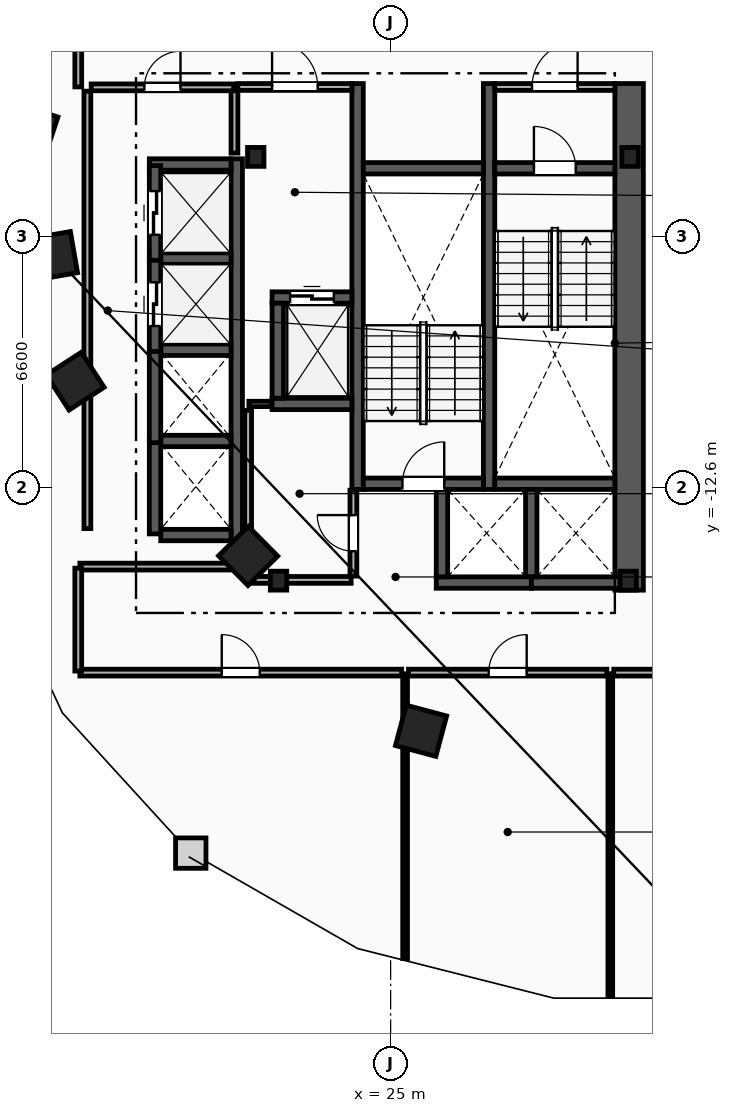
"""IFC4 building model, lengths in metres.
Left out: names, types, materials, properties, quantities, classifications, styles, units other than length and angle.
Written with IfcOpenShell. Run it as: python <this file> out.ifc"""

import sys

from ifc_helpers import new_model, si_unit, direction, frame, frame_2d, origin, origin_2d, place, context, subcontext, project, spatial, rectangle, i_section, extrude, element, fill, save


model = new_model("IFC4")
c1 = context("Model", 3, precision=1e-05, world=origin(), true_north=direction((0.0, 1.0)))
c2 = subcontext(c1, "Body", "Model", "MODEL_VIEW")
j1 = project(units=[si_unit("LENGTHUNIT", "METRE"), si_unit("PLANEANGLEUNIT", "RADIAN")], contexts=[c1])
p1 = place(None, origin())
s1 = spatial("IfcSite", under=j1, at=p1, CompositionType="ELEMENT")
p2 = place(p1, origin())
s2 = spatial("IfcBuilding", under=s1, at=p2, CompositionType="ELEMENT")
p3 = place(p2, frame((0.0, 0.0, 125.0)))
s3 = spatial("IfcBuildingStorey", under=s2, at=p3, CompositionType="ELEMENT", Elevation=125.0)
for number, where, z_axis, x_axis in (
    (1, (31.3, -3.9, 0.0), (0.0, 0.0, 1.0), (1.0, 0.0, 0.0)),
    (2, (21.45, -3.9, 0.0), (0.0, 0.0, 1.0), (1.0, 0.0, 0.0)),
    (3, (22.05, -15.05, 0.0), (0.0, 0.0, 1.0), (1.0, 0.0, 0.0)),
    (4, (31.25, -15.05, 0.0), (0.0, 0.0, 1.0), (1.0, 0.0, 0.0)),
):
    element("IfcColumn", number, at=place(p3, frame(where, z_axis=z_axis, x_axis=x_axis)), inside=s3, PredefinedType="COLUMN", context=c2, shape_type="SweptSolid", body=[
        extrude(i_section(OverallWidth=0.432, OverallDepth=0.498, WebThickness=0.056, FlangeThickness=0.089, FilletRadius=0.018, at=origin_2d()), origin(), (0.0, 0.0, 1.0), 3.6),
    ])
for number, where, z_axis, x_axis in (
    (5, (15.55, -3.2, 0.0), (0.0, 0.0, 1.0), (-0.315, -0.949, 0.0)),
    (6, (16.125, -6.5, 0.0), (0.0, 0.0, 1.0), (0.172, -0.985, 0.0)),
    (7, (16.7, -9.8, 0.0), (0.0, 0.0, 1.0), (0.544, -0.839, 0.0)),
    (8, (21.25, -14.4, 0.0), (0.0, 0.0, 1.0), (0.703, -0.711, 0.0)),
    (9, (25.8, -19.0, 0.0), (0.0, 0.0, 1.0), (0.966, -0.259, 0.0)),
):
    element("IfcColumn", number, at=place(p3, frame(where, z_axis=z_axis, x_axis=x_axis)), inside=s3, PredefinedType="COLUMN", context=c2, shape_type="SweptSolid", body=[
        extrude(rectangle(XDim=1.1, YDim=1.1, at=origin_2d()), origin(), (0.0, 0.0, 1.0), 3.6),
    ])
p4 = place(p3, frame((31.275, -15.3, 0.0), z_axis=(0.0, 0.0, 1.0), x_axis=(0.0, 1.0, 0.0)))
e10 = element("IfcWall", 10, at=p4, inside=s3, PredefinedType="SHEAR", context=c2, shape_type="SweptSolid", body=[
    extrude(rectangle(XDim=13.33, YDim=0.75, at=frame_2d((6.665, 0.0))), origin(), (0.0, 0.0, 1.0), 3.3),
])
for number, where, z_axis, x_axis in (
    (11, (27.59, -12.65, 0.0), (0.0, 0.0, 1.0), (0.0, 1.0, 0.0)),
    (12, (24.13, -12.65, 0.0), (0.0, 0.0, 1.0), (0.0, 1.0, 0.0)),
):
    element("IfcWall", number, at=place(p3, frame(where, z_axis=z_axis, x_axis=x_axis)), inside=s3, PredefinedType="SHEAR", context=c2, shape_type="SweptSolid", body=[
        extrude(rectangle(XDim=10.68, YDim=0.3, at=frame_2d((5.34, 0.0))), origin(), (0.0, 0.0, 1.0), 3.3),
    ])
p5 = place(p3, frame((27.74, -4.2, 0.0), z_axis=(0.0, 0.0, 1.0), x_axis=(1.0, 0.0, 0.0)))
e13 = element("IfcWall", 13, at=p5, inside=s3, PredefinedType="SHEAR", context=c2, shape_type="SweptSolid", body=[
    extrude(rectangle(XDim=3.16, YDim=0.3, at=frame_2d((1.58, 0.0))), origin(), (0.0, 0.0, 1.0), 3.3),
])
p6 = place(p5, frame((1.03, 0.0, 0.0)))
e14 = element("IfcOpeningElement", 14, at=p6, cuts=e13, PredefinedType="OPENING", context=c2, shape_type="SweptSolid", body=[
    extrude(rectangle(XDim=1.1, YDim=2.15, at=frame_2d((0.55, 1.075))), frame((0.0, 0.16, 0.0), z_axis=(0.0, -1.0, 0.0), x_axis=(1.0, 0.0, 0.0)), (0.0, 0.0, 1.0), 0.32),
])
p7 = place(p3, frame((27.74, -12.5, 0.0), z_axis=(0.0, 0.0, 1.0), x_axis=(1.0, 0.0, 0.0)))
e15 = element("IfcWall", 15, at=p7, inside=s3, PredefinedType="SHEAR", context=c2, shape_type="SweptSolid", body=[
    extrude(rectangle(XDim=3.16, YDim=0.3, at=frame_2d((1.58, 0.0))), origin(), (0.0, 0.0, 1.0), 3.3),
])
p8 = place(p3, frame((24.28, -12.5, 0.0), z_axis=(0.0, 0.0, 1.0), x_axis=(1.0, 0.0, 0.0)))
e16 = element("IfcWall", 16, at=p8, inside=s3, PredefinedType="SHEAR", context=c2, shape_type="SweptSolid", body=[
    extrude(rectangle(XDim=3.16, YDim=0.3, at=frame_2d((1.58, 0.0))), origin(), (0.0, 0.0, 1.0), 3.3),
])
p9 = place(p8, frame((1.03, 0.0, 0.0)))
e17 = element("IfcOpeningElement", 17, at=p9, cuts=e16, PredefinedType="OPENING", context=c2, shape_type="SweptSolid", body=[
    extrude(rectangle(XDim=1.1, YDim=2.15, at=frame_2d((0.55, 1.075))), frame((0.0, 0.16, 0.0), z_axis=(0.0, -1.0, 0.0), x_axis=(1.0, 0.0, 0.0)), (0.0, 0.0, 1.0), 0.32),
])
p10 = place(p3, frame((24.28, -4.2, 0.0), z_axis=(0.0, 0.0, 1.0), x_axis=(1.0, 0.0, 0.0)))
e18 = element("IfcWall", 18, at=p10, inside=s3, PredefinedType="SHEAR", context=c2, shape_type="SweptSolid", body=[
    extrude(rectangle(XDim=3.16, YDim=0.3, at=frame_2d((1.58, 0.0))), origin(), (0.0, 0.0, 1.0), 3.3),
])
p11 = place(p3, frame((20.89, -3.8, 0.0), z_axis=(0.0, 0.0, 1.0), x_axis=(0.0, 1.0, 0.0)))
e19 = element("IfcWall", 19, at=p11, inside=s3, PredefinedType="PARTITIONING", context=c2, shape_type="SweptSolid", body=[
    extrude(rectangle(XDim=1.65, YDim=0.18, at=frame_2d((0.825, 0.0))), origin(), (0.0, 0.0, 1.0), 3.3),
])
p12 = place(p3, frame((20.98, -2.06, 0.0), z_axis=(0.0, 0.0, 1.0), x_axis=(1.0, 0.0, 0.0)))
e20 = element("IfcWall", 20, at=p12, inside=s3, PredefinedType="PARTITIONING", context=c2, shape_type="SweptSolid", body=[
    extrude(rectangle(XDim=3.0, YDim=0.18, at=frame_2d((1.5, 0.0))), origin(), (0.0, 0.0, 1.0), 3.3),
])
p13 = place(p12, frame((0.9, 0.0, 0.0)))
e21 = element("IfcOpeningElement", 21, at=p13, cuts=e20, PredefinedType="OPENING", context=c2, shape_type="SweptSolid", body=[
    extrude(rectangle(XDim=1.2, YDim=2.15, at=frame_2d((0.6, 1.075))), frame((0.0, 0.1, 0.0), z_axis=(0.0, -1.0, 0.0), x_axis=(1.0, 0.0, 0.0)), (0.0, 0.0, 1.0), 0.2),
])
p14 = place(p3, frame((27.74, -2.06, 0.0), z_axis=(0.0, 0.0, 1.0), x_axis=(1.0, 0.0, 0.0)))
e22 = element("IfcWall", 22, at=p14, inside=s3, PredefinedType="PARTITIONING", context=c2, shape_type="SweptSolid", body=[
    extrude(rectangle(XDim=3.16, YDim=0.18, at=frame_2d((1.58, 0.0))), origin(), (0.0, 0.0, 1.0), 3.3),
])
p15 = place(p14, frame((0.98, 0.0, 0.0)))
e23 = element("IfcOpeningElement", 23, at=p15, cuts=e22, PredefinedType="OPENING", context=c2, shape_type="SweptSolid", body=[
    extrude(rectangle(XDim=1.2, YDim=2.15, at=frame_2d((0.6, 1.075))), frame((0.0, 0.1, 0.0), z_axis=(0.0, -1.0, 0.0), x_axis=(1.0, 0.0, 0.0)), (0.0, 0.0, 1.0), 0.2),
])
p16 = place(p3, frame((21.88, -7.6, 0.0), z_axis=(0.0, 0.0, 1.0), x_axis=(1.0, 0.0, 0.0)))
e24 = element("IfcWall", 24, at=p16, inside=s3, PredefinedType="SHEAR", context=c2, shape_type="SweptSolid", body=[
    extrude(rectangle(XDim=2.1, YDim=0.3, at=frame_2d((1.05, 0.0))), origin(), (0.0, 0.0, 1.0), 3.3),
])
p17 = place(p16, frame((0.475, 0.0, 0.0)))
e25 = element("IfcOpeningElement", 25, at=p17, cuts=e24, PredefinedType="OPENING", context=c2, shape_type="SweptSolid", body=[
    extrude(rectangle(XDim=1.15, YDim=2.2, at=frame_2d((0.575, 1.1))), frame((0.0, 0.16, 0.0), z_axis=(0.0, -1.0, 0.0), x_axis=(1.0, 0.0, 0.0)), (0.0, 0.0, 1.0), 0.32),
])
p18 = place(p3, frame((21.88, -10.4, 0.0), z_axis=(0.0, 0.0, 1.0), x_axis=(1.0, 0.0, 0.0)))
e26 = element("IfcWall", 26, at=p18, inside=s3, PredefinedType="SHEAR", context=c2, shape_type="SweptSolid", body=[
    extrude(rectangle(XDim=2.1, YDim=0.3, at=frame_2d((1.05, 0.0))), origin(), (0.0, 0.0, 1.0), 3.3),
])
for number, where, z_axis, x_axis in (
    (27, (22.03, -10.25, 0.0), (0.0, 0.0, 1.0), (0.0, 1.0, 0.0)),
    (28, (28.7, -15.1, 0.0), (0.0, 0.0, 1.0), (1.0, 0.0, 0.0)),
):
    element("IfcWall", number, at=place(p3, frame(where, z_axis=z_axis, x_axis=x_axis)), inside=s3, PredefinedType="SHEAR", context=c2, shape_type="SweptSolid", body=[
        extrude(rectangle(XDim=2.5, YDim=0.3, at=frame_2d((1.25, 0.0))), origin(), (0.0, 0.0, 1.0), 3.3),
    ])
p19 = place(p3, frame((28.7, -14.95, 0.0), z_axis=(0.0, 0.0, 1.0), x_axis=(0.0, 1.0, 0.0)))
e29 = element("IfcWall", 29, at=p19, inside=s3, PredefinedType="SHEAR", context=c2, shape_type="SweptSolid", body=[
    extrude(rectangle(XDim=2.3, YDim=0.3, at=frame_2d((1.15, 0.0))), origin(), (0.0, 0.0, 1.0), 3.3),
])
p20 = place(p3, frame((26.2, -15.1, 0.0), z_axis=(0.0, 0.0, 1.0), x_axis=(1.0, 0.0, 0.0)))
e30 = element("IfcWall", 30, at=p20, inside=s3, PredefinedType="SHEAR", context=c2, shape_type="SweptSolid", body=[
    extrude(rectangle(XDim=2.5, YDim=0.3, at=frame_2d((1.25, 0.0))), origin(), (0.0, 0.0, 1.0), 3.3),
])
p21 = place(p3, frame((26.35, -14.95, 0.0), z_axis=(0.0, 0.0, 1.0), x_axis=(0.0, 1.0, 0.0)))
e31 = element("IfcWall", 31, at=p21, inside=s3, PredefinedType="SHEAR", context=c2, shape_type="SweptSolid", body=[
    extrude(rectangle(XDim=2.3, YDim=0.3, at=frame_2d((1.15, 0.0))), origin(), (0.0, 0.0, 1.0), 3.3),
])
p22 = place(p3, frame((20.95, -14.0, 0.0), z_axis=(0.0, 0.0, 1.0), x_axis=(0.0, 1.0, 0.0)))
e32 = element("IfcWall", 32, at=p22, inside=s3, PredefinedType="SHEAR", context=c2, shape_type="SweptSolid", body=[
    extrude(rectangle(XDim=10.05, YDim=0.3, at=frame_2d((5.025, 0.0))), origin(), (0.0, 0.0, 1.0), 3.3),
])
p23 = place(p3, frame((18.95, -13.85, 0.0), z_axis=(0.0, 0.0, 1.0), x_axis=(1.0, 0.0, 0.0)))
e33 = element("IfcWall", 33, at=p23, inside=s3, PredefinedType="SHEAR", context=c2, shape_type="SweptSolid", body=[
    extrude(rectangle(XDim=1.85, YDim=0.3, at=frame_2d((0.925, 0.0))), origin(), (0.0, 0.0, 1.0), 3.3),
])
p24 = place(p3, frame((18.65, -4.1, 0.0), z_axis=(0.0, 0.0, 1.0), x_axis=(1.0, 0.0, 0.0)))
e34 = element("IfcWall", 34, at=p24, inside=s3, PredefinedType="SHEAR", context=c2, shape_type="SweptSolid", body=[
    extrude(rectangle(XDim=2.15, YDim=0.3, at=frame_2d((1.075, 0.0))), origin(), (0.0, 0.0, 1.0), 3.3),
])
for number, where, z_axis, x_axis in (
    (35, (18.95, -11.375, 0.0), (0.0, 0.0, 1.0), (1.0, 0.0, 0.0)),
    (36, (18.95, -8.975, 0.0), (0.0, 0.0, 1.0), (1.0, 0.0, 0.0)),
    (37, (18.95, -6.575, 0.0), (0.0, 0.0, 1.0), (1.0, 0.0, 0.0)),
):
    element("IfcWall", number, at=place(p3, frame(where, z_axis=z_axis, x_axis=x_axis)), inside=s3, PredefinedType="SHEAR", context=c2, shape_type="SweptSolid", body=[
        extrude(rectangle(XDim=1.85, YDim=0.3, at=frame_2d((0.925, 0.0))), origin(), (0.0, 0.0, 1.0), 3.3),
    ])
for number, where, z_axis, x_axis in (
    (38, (18.8, -13.82, 0.0), (0.0, 0.0, 1.0), (0.0, 1.0, 0.0)),
    (39, (18.8, -11.42, 0.0), (0.0, 0.0, 1.0), (0.0, 1.0, 0.0)),
):
    element("IfcWall", number, at=place(p3, frame(where, z_axis=z_axis, x_axis=x_axis)), inside=s3, PredefinedType="SHEAR", context=c2, shape_type="SweptSolid", body=[
        extrude(rectangle(XDim=2.49, YDim=0.3, at=frame_2d((1.245, 0.0))), origin(), (0.0, 0.0, 1.0), 3.3),
    ])
p25 = place(p3, frame((18.8, -9.02, 0.0), z_axis=(0.0, 0.0, 1.0), x_axis=(0.0, 1.0, 0.0)))
e40 = element("IfcWall", 40, at=p25, inside=s3, PredefinedType="SHEAR", context=c2, shape_type="SweptSolid", body=[
    extrude(rectangle(XDim=2.49, YDim=0.3, at=frame_2d((1.245, 0.0))), origin(), (0.0, 0.0, 1.0), 3.3),
])
p26 = place(p25, frame((0.67, 0.0, 0.0)))
e41 = element("IfcOpeningElement", 41, at=p26, cuts=e40, PredefinedType="OPENING", context=c2, shape_type="SweptSolid", body=[
    extrude(rectangle(XDim=1.15, YDim=2.2, at=frame_2d((0.575, 1.1))), frame((0.0, 0.16, 0.0), z_axis=(0.0, -1.0, 0.0), x_axis=(1.0, 0.0, 0.0)), (0.0, 0.0, 1.0), 0.32),
])
p27 = place(p3, frame((18.8, -6.62, 0.0), z_axis=(0.0, 0.0, 1.0), x_axis=(0.0, 1.0, 0.0)))
e42 = element("IfcWall", 42, at=p27, inside=s3, PredefinedType="SHEAR", context=c2, shape_type="SweptSolid", body=[
    extrude(rectangle(XDim=2.49, YDim=0.3, at=frame_2d((1.245, 0.0))), origin(), (0.0, 0.0, 1.0), 3.3),
])
p28 = place(p27, frame((0.67, 0.0, 0.0)))
e43 = element("IfcOpeningElement", 43, at=p28, cuts=e42, PredefinedType="OPENING", context=c2, shape_type="SweptSolid", body=[
    extrude(rectangle(XDim=1.15, YDim=2.2, at=frame_2d((0.575, 1.1))), frame((0.0, 0.16, 0.0), z_axis=(0.0, -1.0, 0.0), x_axis=(1.0, 0.0, 0.0)), (0.0, 0.0, 1.0), 0.32),
])
p29 = place(p3, frame((17.02, -13.68, 0.0), z_axis=(0.0, 0.0, 1.0), x_axis=(0.0, 1.0, 0.0)))
e44 = element("IfcWall", 44, at=p29, inside=s3, PredefinedType="PARTITIONING", context=c2, shape_type="SweptSolid", body=[
    extrude(rectangle(XDim=11.51, YDim=0.18, at=frame_2d((5.755, 0.0))), origin(), (0.0, 0.0, 1.0), 3.3),
])
p30 = place(p3, frame((17.12, -2.07, 0.0), z_axis=(0.0, 0.0, 1.0), x_axis=(1.0, 0.0, 0.0)))
e45 = element("IfcWall", 45, at=p30, inside=s3, PredefinedType="PARTITIONING", context=c2, shape_type="SweptSolid", body=[
    extrude(rectangle(XDim=3.75, YDim=0.18, at=frame_2d((1.875, 0.0))), origin(), (0.0, 0.0, 1.0), 3.3),
])
p31 = place(p30, frame((1.4, 0.0, 0.0)))
e46 = element("IfcOpeningElement", 46, at=p31, cuts=e45, PredefinedType="OPENING", context=c2, shape_type="SweptSolid", body=[
    extrude(rectangle(XDim=0.95, YDim=2.1, at=frame_2d((0.475, 1.05))), frame((0.0, 0.1, 0.0), z_axis=(0.0, -1.0, 0.0), x_axis=(1.0, 0.0, 0.0)), (0.0, 0.0, 1.0), 0.2),
])
p32 = place(p3, frame((21.27, -10.4, 0.0), z_axis=(0.0, 0.0, 1.0), x_axis=(1.0, 0.0, 0.0)))
e47 = element("IfcWall", 47, at=p32, inside=s3, PredefinedType="PARTITIONING", context=c2, shape_type="SweptSolid", body=[
    extrude(rectangle(XDim=0.59, YDim=0.14, at=frame_2d((0.295, 0.0))), origin(), (0.0, 0.0, 1.0), 3.3),
])
p33 = place(p3, frame((21.25, -14.93, 0.0), z_axis=(0.0, 0.0, 1.0), x_axis=(0.0, 1.0, 0.0)))
e48 = element("IfcWall", 48, at=p33, inside=s3, PredefinedType="PARTITIONING", context=c2, shape_type="SweptSolid", body=[
    extrude(rectangle(XDim=4.36, YDim=0.18, at=frame_2d((2.18, 0.0))), origin(), (0.0, 0.0, 1.0), 3.3),
])
p34 = place(p3, frame((21.35, -15.03, 0.0), z_axis=(0.0, 0.0, 1.0), x_axis=(1.0, 0.0, 0.0)))
e49 = element("IfcWall", 49, at=p34, inside=s3, PredefinedType="PARTITIONING", context=c2, shape_type="SweptSolid", body=[
    extrude(rectangle(XDim=2.61, YDim=0.18, at=frame_2d((1.305, 0.0))), origin(), (0.0, 0.0, 1.0), 2.373),
])
p35 = place(p3, frame((24.02, -14.93, 0.0), z_axis=(0.0, 0.0, 1.0), x_axis=(0.0, 1.0, 0.0)))
e50 = element("IfcWall", 50, at=p35, inside=s3, PredefinedType="PARTITIONING", context=c2, shape_type="SweptSolid", body=[
    extrude(rectangle(XDim=2.26, YDim=0.18, at=frame_2d((1.13, 0.0))), origin(), (0.0, 0.0, 1.0), 3.3),
])
p36 = place(p35, frame((0.655, 0.0, 0.0)))
e51 = element("IfcOpeningElement", 51, at=p36, cuts=e50, PredefinedType="OPENING", context=c2, shape_type="SweptSolid", body=[
    extrude(rectangle(XDim=0.95, YDim=2.1, at=frame_2d((0.475, 1.05))), frame((0.0, 0.1, 0.0), z_axis=(0.0, -1.0, 0.0), x_axis=(1.0, 0.0, 0.0)), (0.0, 0.0, 1.0), 0.2),
])
p37 = place(p3, frame((25.38, -24.995, 0.0), z_axis=(0.0, 0.0, 1.0), x_axis=(0.0, 1.0, 0.0)))
e52 = element("IfcWall", 52, at=p37, inside=s3, PredefinedType="PARTITIONING", context=c2, shape_type="SweptSolid", body=[
    extrude(rectangle(XDim=7.495, YDim=0.125, at=frame_2d((3.747, 0.0))), origin(), (0.0, 0.0, 1.0), 3.3),
])
p38 = place(p3, frame((30.78, -25.985, 0.0), z_axis=(0.0, 0.0, 1.0), x_axis=(0.0, 1.0, 0.0)))
e53 = element("IfcWall", 53, at=p38, inside=s3, PredefinedType="PARTITIONING", context=c2, shape_type="SweptSolid", body=[
    extrude(rectangle(XDim=8.485, YDim=0.125, at=frame_2d((4.243, 0.0))), origin(), (0.0, 0.0, 1.0), 3.3),
])
p39 = place(p3, frame((25.47, -17.47, 0.0), z_axis=(0.0, 0.0, 1.0), x_axis=(1.0, 0.0, 0.0)))
e54 = element("IfcWall", 54, at=p39, inside=s3, PredefinedType="PARTITIONING", context=c2, shape_type="SweptSolid", body=[
    extrude(rectangle(XDim=5.22, YDim=0.18, at=frame_2d((2.61, 0.0))), origin(), (0.0, 0.0, 1.0), 3.3),
])
p40 = place(p39, frame((2.11, 0.0, 0.0)))
e55 = element("IfcOpeningElement", 55, at=p40, cuts=e54, PredefinedType="OPENING", context=c2, shape_type="SweptSolid", body=[
    extrude(rectangle(XDim=1.0, YDim=2.15, at=frame_2d((0.5, 1.075))), frame((0.0, 0.1, 0.0), z_axis=(0.0, -1.0, 0.0), x_axis=(1.0, 0.0, 0.0)), (0.0, 0.0, 1.0), 0.2),
])
p41 = place(p3, frame((16.822, -17.47, 0.0), z_axis=(0.0, 0.0, 1.0), x_axis=(1.0, 0.0, 0.0)))
e56 = element("IfcWall", 56, at=p41, inside=s3, PredefinedType="PARTITIONING", context=c2, shape_type="SweptSolid", body=[
    extrude(rectangle(XDim=8.469, YDim=0.18, at=frame_2d((4.234, 0.0))), origin(), (0.0, 0.0, 1.0), 3.3),
])
p42 = place(p41, frame((3.734, 0.0, 0.0)))
e57 = element("IfcOpeningElement", 57, at=p42, cuts=e56, PredefinedType="OPENING", context=c2, shape_type="SweptSolid", body=[
    extrude(rectangle(XDim=1.0, YDim=2.15, at=frame_2d((0.5, 1.075))), frame((0.0, 0.1, 0.0), z_axis=(0.0, -1.0, 0.0), x_axis=(1.0, 0.0, 0.0)), (0.0, 0.0, 1.0), 0.2),
])
p43 = place(p3, frame((21.178, -14.68, 0.0), z_axis=(0.0, 0.0, 1.0), x_axis=(-1.0, 0.0, 0.0)))
e58 = element("IfcWall", 58, at=p43, inside=s3, PredefinedType="PARTITIONING", context=c2, shape_type="SweptSolid", body=[
    extrude(rectangle(XDim=4.357, YDim=0.18, at=frame_2d((2.178, 0.0))), origin(), (0.0, 0.0, 1.0), 3.3),
])
p44 = place(p3, frame((16.78, -14.721, 0.0), z_axis=(0.0, 0.0, 1.0), x_axis=(0.0, -1.0, 0.0)))
e59 = element("IfcWall", 59, at=p44, inside=s3, PredefinedType="PARTITIONING", context=c2, shape_type="SweptSolid", body=[
    extrude(rectangle(XDim=2.707, YDim=0.18, at=frame_2d((1.354, 0.0))), origin(), (0.0, 0.0, 1.0), 3.3),
])
p45 = place(p3, frame((16.78, 0.329, 0.0), z_axis=(0.0, 0.0, 1.0), x_axis=(0.0, -1.0, 0.0)))
e60 = element("IfcWall", 60, at=p45, inside=s3, PredefinedType="PARTITIONING", context=c2, shape_type="SweptSolid", body=[
    extrude(rectangle(XDim=2.387, YDim=0.18, at=frame_2d((1.194, 0.0))), origin(), (0.0, 0.0, 1.0), 3.3),
])
p46 = place(p3, frame((30.87, -17.47, 0.0), z_axis=(0.0, 0.0, 1.0), x_axis=(1.0, 0.0, 0.0)))
e61 = element("IfcWall", 61, at=p46, inside=s3, PredefinedType="PARTITIONING", context=c2, shape_type="SweptSolid", body=[
    extrude(rectangle(XDim=2.758, YDim=0.18, at=frame_2d((1.379, 0.0))), origin(), (0.0, 0.0, 1.0), 3.3),
])
p47 = place(p6, origin())
e62 = element("IfcDoor", 62, at=p47, inside=s3, OperationType="SINGLE_SWING_LEFT", PredefinedType="DOOR", context=c2, shape_type="SweptSolid", body=[
    extrude(rectangle(XDim=1.1, YDim=2.15, at=frame_2d((0.55, 1.075))), frame((0.0, 0.025, 0.0), z_axis=(0.0, -1.0, 0.0), x_axis=(1.0, 0.0, 0.0)), (0.0, 0.0, 1.0), 0.05),
])
fill(e14, e62)
p48 = place(p9, origin())
e63 = element("IfcDoor", 63, at=p48, inside=s3, OperationType="SINGLE_SWING_RIGHT", PredefinedType="DOOR", context=c2, shape_type="SweptSolid", body=[
    extrude(rectangle(XDim=1.1, YDim=2.15, at=frame_2d((0.55, 1.075))), frame((0.0, 0.025, 0.0), z_axis=(0.0, -1.0, 0.0), x_axis=(1.0, 0.0, 0.0)), (0.0, 0.0, 1.0), 0.05),
])
fill(e17, e63)
p49 = place(p13, origin())
e64 = element("IfcDoor", 64, at=p49, inside=s3, OperationType="SINGLE_SWING_LEFT", PredefinedType="DOOR", context=c2, shape_type="SweptSolid", body=[
    extrude(rectangle(XDim=1.2, YDim=2.15, at=frame_2d((0.6, 1.075))), frame((0.0, 0.025, 0.0), z_axis=(0.0, -1.0, 0.0), x_axis=(1.0, 0.0, 0.0)), (0.0, 0.0, 1.0), 0.05),
])
fill(e21, e64)
p50 = place(p15, origin())
e65 = element("IfcDoor", 65, at=p50, inside=s3, OperationType="SINGLE_SWING_RIGHT", PredefinedType="DOOR", context=c2, shape_type="SweptSolid", body=[
    extrude(rectangle(XDim=1.2, YDim=2.15, at=frame_2d((0.6, 1.075))), frame((0.0, 0.025, 0.0), z_axis=(0.0, -1.0, 0.0), x_axis=(1.0, 0.0, 0.0)), (0.0, 0.0, 1.0), 0.05),
])
fill(e23, e65)
p51 = place(p17, origin())
e66 = element("IfcDoor", 66, at=p51, inside=s3, OperationType="SLIDING_TO_LEFT", PredefinedType="TRAPDOOR", context=c2, shape_type="SweptSolid", body=[
    extrude(rectangle(XDim=1.15, YDim=2.2, at=frame_2d((0.575, 1.1))), frame((0.0, 0.025, 0.0), z_axis=(0.0, -1.0, 0.0), x_axis=(1.0, 0.0, 0.0)), (0.0, 0.0, 1.0), 0.05),
])
fill(e25, e66)
p52 = place(p26, origin())
e67 = element("IfcDoor", 67, at=p52, inside=s3, OperationType="SLIDING_TO_LEFT", PredefinedType="TRAPDOOR", context=c2, shape_type="SweptSolid", body=[
    extrude(rectangle(XDim=1.15, YDim=2.2, at=frame_2d((0.575, 1.1))), frame((0.0, 0.025, 0.0), z_axis=(0.0, -1.0, 0.0), x_axis=(1.0, 0.0, 0.0)), (0.0, 0.0, 1.0), 0.05),
])
fill(e41, e67)
p53 = place(p28, origin())
e68 = element("IfcDoor", 68, at=p53, inside=s3, OperationType="SLIDING_TO_LEFT", PredefinedType="TRAPDOOR", context=c2, shape_type="SweptSolid", body=[
    extrude(rectangle(XDim=1.15, YDim=2.2, at=frame_2d((0.575, 1.1))), frame((0.0, 0.025, 0.0), z_axis=(0.0, -1.0, 0.0), x_axis=(1.0, 0.0, 0.0)), (0.0, 0.0, 1.0), 0.05),
])
fill(e43, e68)
p54 = place(p42, origin())
e69 = element("IfcDoor", 69, at=p54, inside=s3, OperationType="SINGLE_SWING_LEFT", PredefinedType="DOOR", context=c2, shape_type="SweptSolid", body=[
    extrude(rectangle(XDim=1.0, YDim=2.15, at=frame_2d((0.5, 1.075))), frame((0.0, 0.025, 0.0), z_axis=(0.0, -1.0, 0.0), x_axis=(1.0, 0.0, 0.0)), (0.0, 0.0, 1.0), 0.05),
])
fill(e57, e69)
p55 = place(p40, origin())
e70 = element("IfcDoor", 70, at=p55, inside=s3, OperationType="SINGLE_SWING_RIGHT", PredefinedType="DOOR", context=c2, shape_type="SweptSolid", body=[
    extrude(rectangle(XDim=1.0, YDim=2.15, at=frame_2d((0.5, 1.075))), frame((0.0, 0.025, 0.0), z_axis=(0.0, -1.0, 0.0), x_axis=(1.0, 0.0, 0.0)), (0.0, 0.0, 1.0), 0.05),
])
fill(e55, e70)
p56 = place(p31, origin())
e71 = element("IfcDoor", 71, at=p56, inside=s3, OperationType="SINGLE_SWING_RIGHT", PredefinedType="DOOR", context=c2, shape_type="SweptSolid", body=[
    extrude(rectangle(XDim=0.95, YDim=2.1, at=frame_2d((0.475, 1.05))), frame((0.0, 0.025, 0.0), z_axis=(0.0, -1.0, 0.0), x_axis=(1.0, 0.0, 0.0)), (0.0, 0.0, 1.0), 0.05),
])
fill(e46, e71)
p57 = place(p36, origin())
e72 = element("IfcDoor", 72, at=p57, inside=s3, OperationType="SINGLE_SWING_RIGHT", PredefinedType="DOOR", context=c2, shape_type="SweptSolid", body=[
    extrude(rectangle(XDim=0.95, YDim=2.1, at=frame_2d((0.475, 1.05))), frame((0.0, 0.025, 0.0), z_axis=(0.0, -1.0, 0.0), x_axis=(1.0, 0.0, 0.0)), (0.0, 0.0, 1.0), 0.05),
])
fill(e51, e72)
save(model, sys.argv[1])
